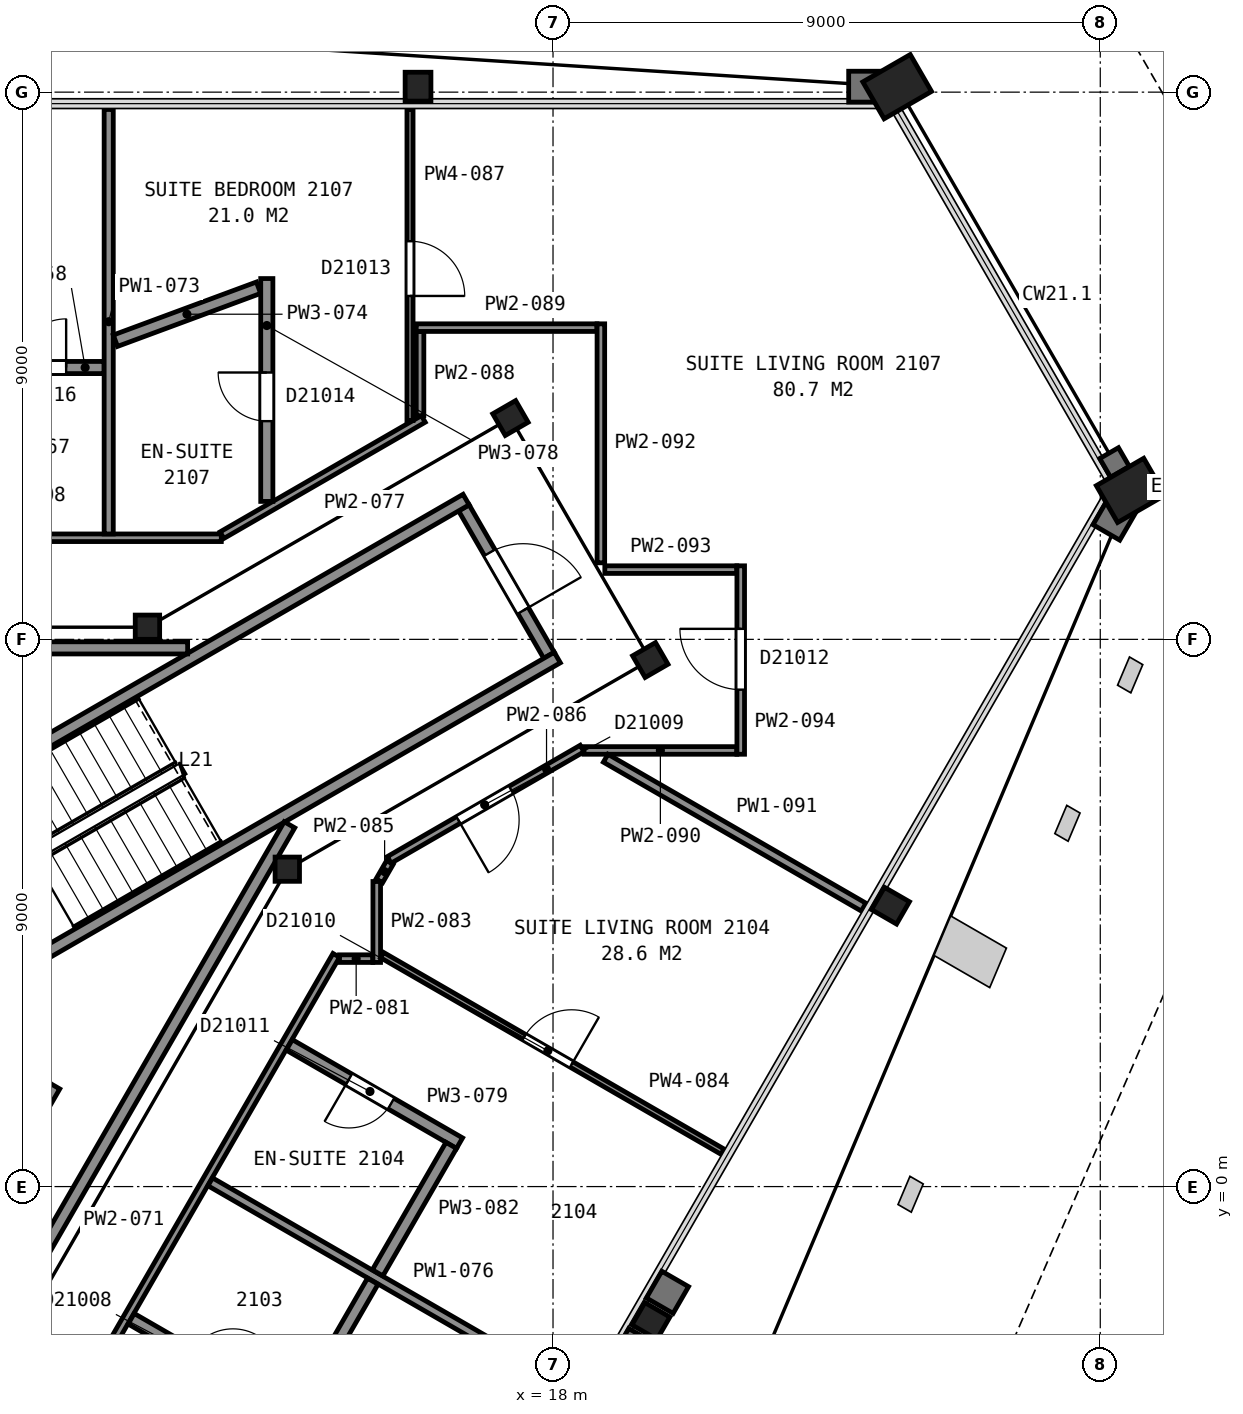
"""IFC4 building model, lengths in metres.
Left out: names, types, materials, properties, quantities, classifications, styles, units other than length and angle.
Written with IfcOpenShell. Run it as: python <this file> out.ifc"""

import sys

from ifc_helpers import new_model, si_unit, direction, frame, frame_2d, origin, origin_2d, place, context, subcontext, project, spatial, rectangle, hollow_rectangle, i_section, extrude, element, fill, save


model = new_model("IFC4")
c1 = context("Model", 3, precision=1e-05, world=origin(), true_north=direction((0.0, 1.0)))
c2 = subcontext(c1, "Body", "Model", "MODEL_VIEW")
j1 = project(units=[si_unit("LENGTHUNIT", "METRE"), si_unit("PLANEANGLEUNIT", "RADIAN")], contexts=[c1])
p1 = place(None, origin())
s1 = spatial("IfcSite", under=j1, at=p1, CompositionType="ELEMENT")
p2 = place(p1, origin())
s2 = spatial("IfcBuilding", under=s1, at=p2, CompositionType="ELEMENT")
p3 = place(p2, frame((0.0, 0.0, 92.8)))
s3 = spatial("IfcBuildingStorey", under=s2, at=p3, CompositionType="ELEMENT", Elevation=92.8)
p4 = place(p3, frame((23.66, 18.09, 0.0), z_axis=(0.0, 0.0, 1.0), x_axis=(0.5, -0.866025403784, 0.0)))
e1 = element("IfcColumn", 1, at=p4, inside=s3, PredefinedType="COLUMN", context=c2, shape_type="SweptSolid", body=[
    extrude(hollow_rectangle(XDim=0.7, YDim=0.9, WallThickness=0.065, at=origin_2d()), origin(), (0.0, 0.0, 1.0), 3.6),
])
for number, where, z_axis, x_axis in (
    (2, (15.78, 18.09, 0.0), (0.0, 0.0, 1.0), (1.0, 0.0, 0.0)),
    (3, (19.61, -2.21, 0.0), (0.0, 0.0, 1.0), (-0.5, -0.866, 0.0)),
    (4, (23.55, 4.62, 0.0), (0.0, 0.0, 1.0), (-0.5, -0.866, 0.0)),
):
    element("IfcColumn", number, at=place(p3, frame(where, z_axis=z_axis, x_axis=x_axis)), inside=s3, PredefinedType="COLUMN", context=c2, shape_type="SweptSolid", body=[
        extrude(i_section(OverallWidth=0.424, OverallDepth=0.475, WebThickness=0.048, FlangeThickness=0.077, FilletRadius=0.015, at=origin_2d()), origin(), (0.0, 0.0, 1.0), 3.6),
    ])
p5 = place(p3, frame((27.5, 11.45, 0.0), z_axis=(0.0, 0.0, 1.0), x_axis=(0.5, -0.866025403784, 0.0)))
e5 = element("IfcColumn", 5, at=p5, inside=s3, PredefinedType="COLUMN", context=c2, shape_type="SweptSolid", body=[
    extrude(hollow_rectangle(XDim=0.7, YDim=0.9, WallThickness=0.065, at=origin_2d()), origin(), (0.0, 0.0, 1.0), 3.6),
])
p6 = place(p3, frame((13.63, 5.22, 0.0), z_axis=(0.0, 0.0, 1.0), x_axis=(1.0, 0.0, 0.0)))
e6 = element("IfcColumn", 6, at=p6, inside=s3, PredefinedType="COLUMN", context=c2, shape_type="SweptSolid", body=[
    extrude(i_section(OverallWidth=0.401, OverallDepth=0.399, WebThickness=0.025, FlangeThickness=0.04, FilletRadius=0.015, at=origin_2d()), origin(), (0.0, 0.0, 1.0), 3.6),
])
for number, where, z_axis, x_axis in (
    (7, (19.6, 8.66, 0.0), (0.0, 0.0, 1.0), (0.5, -0.866, 0.0)),
    (8, (17.3, 12.64, 0.0), (0.0, 0.0, 1.0), (0.5, -0.866, 0.0)),
):
    element("IfcColumn", number, at=place(p3, frame(where, z_axis=z_axis, x_axis=x_axis)), inside=s3, PredefinedType="COLUMN", context=c2, shape_type="SweptSolid", body=[
        extrude(i_section(OverallWidth=0.411, OverallDepth=0.434, WebThickness=0.036, FlangeThickness=0.057, FilletRadius=0.015, at=origin_2d()), origin(), (0.0, 0.0, 1.0), 3.6),
    ])
p7 = place(p3, frame((11.33, 9.2, 0.0), z_axis=(0.0, 0.0, 1.0), x_axis=(1.0, 0.0, 0.0)))
e9 = element("IfcColumn", 9, at=p7, inside=s3, PredefinedType="COLUMN", context=c2, shape_type="SweptSolid", body=[
    extrude(i_section(OverallWidth=0.401, OverallDepth=0.399, WebThickness=0.025, FlangeThickness=0.04, FilletRadius=0.015, at=origin_2d()), origin(), (0.0, 0.0, 1.0), 3.6),
])
p8 = place(p3, frame((17.934, 8.738, 0.0), z_axis=(0.0, 0.0, 1.0), x_axis=(-0.49998411664, 0.866034573852, 0.0)))
e10 = element("IfcWall", 10, at=p8, inside=s3, PredefinedType="PARTITIONING", context=c2, shape_type="SweptSolid", body=[
    extrude(rectangle(XDim=2.8, YDim=0.2, at=frame_2d((1.4, 0.0))), origin(), (0.0, 0.0, 1.0), 3.35),
])
p9 = place(p8, frame((0.85, 0.0, 0.0)))
e11 = element("IfcOpeningElement", 11, at=p9, cuts=e10, PredefinedType="OPENING", context=c2, shape_type="SweptSolid", body=[
    extrude(rectangle(XDim=1.1, YDim=2.1, at=frame_2d((0.55, 1.05))), frame((0.0, 0.11, 0.0), z_axis=(0.0, -1.0, 0.0), x_axis=(1.0, 0.0, 0.0)), (0.0, 0.0, 1.0), 0.22),
])
for number, where, z_axis, x_axis in (
    (12, (6.178, 5.299, 0.0), (0.0, 0.0, 1.0), (0.866, 0.5, 0.0)),
    (13, (7.678, 2.701, 0.0), (0.0, 0.0, 1.0), (0.866, 0.5, 0.0)),
):
    element("IfcWall", number, at=place(p3, frame(where, z_axis=z_axis, x_axis=x_axis)), inside=s3, PredefinedType="PARTITIONING", context=c2, shape_type="SweptSolid", body=[
        extrude(rectangle(XDim=12.0, YDim=0.2, at=frame_2d((6.0, 0.0))), origin(), (0.0, 0.0, 1.0), 3.35),
    ])
p10 = place(p3, frame((7.451, -2.414, 0.0), z_axis=(0.0, 0.0, 1.0), x_axis=(0.500016218704, 0.866016039709, 0.0)))
e14 = element("IfcWall", 14, at=p10, inside=s3, PredefinedType="PARTITIONING", context=c2, shape_type="SweptSolid", body=[
    extrude(rectangle(XDim=4.7, YDim=0.2, at=frame_2d((2.35, 0.0))), origin(), (0.0, 0.0, 1.0), 3.6),
])
p11 = place(p3, frame((6.177, 8.86, 0.0), z_axis=(0.0, 0.0, 1.0), x_axis=(1.0, 0.0, 0.0)))
e15 = element("IfcWall", 15, at=p11, inside=s3, PredefinedType="PARTITIONING", context=c2, shape_type="SweptSolid", body=[
    extrude(rectangle(XDim=5.814, YDim=0.2, at=frame_2d((2.907, 0.0))), origin(), (0.0, 0.0, 1.0), 3.35),
])
p12 = place(p3, frame((8.492, -3.012, 0.0), z_axis=(0.0, 0.0, 1.0), x_axis=(0.499972957231, 0.866041016371, 0.0)))
e16 = element("IfcWall", 16, at=p12, inside=s3, PredefinedType="PARTITIONING", context=c2, shape_type="SweptSolid", body=[
    extrude(rectangle(XDim=10.349, YDim=0.2, at=frame_2d((5.174, 0.0))), origin(), (0.0, 0.0, 1.0), 3.35),
])
p13 = place(p3, frame((-12.544, 10.671, 0.0), z_axis=(0.0, 0.0, 1.0), x_axis=(1.0, 0.0, 0.0)))
e17 = element("IfcWall", 17, at=p13, inside=s3, PredefinedType="PARTITIONING", context=c2, shape_type="SweptSolid", body=[
    extrude(rectangle(XDim=25.089, YDim=0.125, at=frame_2d((12.544, 0.0))), origin(), (0.0, 0.0, 1.0), 2.613),
])
p14 = place(p13, frame((18.962, 0.0, 0.0)))
e18 = element("IfcOpeningElement", 18, at=p14, cuts=e17, PredefinedType="OPENING", context=c2, shape_type="SweptSolid", body=[
    extrude(rectangle(XDim=0.9, YDim=2.1, at=frame_2d((0.45, 1.05))), frame((0.0, 0.073, 0.0), z_axis=(0.0, -1.0, 0.0), x_axis=(1.0, 0.0, 0.0)), (0.0, 0.0, 1.0), 0.145),
])
p15 = place(p13, frame((14.857, 0.0, 0.0)))
e19 = element("IfcOpeningElement", 19, at=p15, cuts=e17, PredefinedType="OPENING", context=c2, shape_type="SweptSolid", body=[
    extrude(rectangle(XDim=1.0, YDim=2.1, at=frame_2d((0.5, 1.05))), frame((0.0, 0.073, 0.0), z_axis=(0.0, -1.0, 0.0), x_axis=(1.0, 0.0, 0.0)), (0.0, 0.0, 1.0), 0.145),
])
p16 = place(p3, frame((10.618, 13.471, 0.0), z_axis=(0.0, 0.0, 1.0), x_axis=(-1.0, 0.0, 0.0)))
e20 = element("IfcWall", 20, at=p16, inside=s3, PredefinedType="PARTITIONING", context=c2, shape_type="SweptSolid", body=[
    extrude(rectangle(XDim=2.025, YDim=0.2, at=frame_2d((1.012, 0.0))), origin(), (0.0, 0.0, 1.0), 2.613),
])
p17 = place(p16, frame((0.625, 0.0, 0.0)))
e21 = element("IfcOpeningElement", 21, at=p17, cuts=e20, PredefinedType="OPENING", context=c2, shape_type="SweptSolid", body=[
    extrude(rectangle(XDim=0.8, YDim=2.1, at=frame_2d((0.4, 1.05))), frame((0.0, 0.11, 0.0), z_axis=(0.0, -1.0, 0.0), x_axis=(1.0, 0.0, 0.0)), (0.0, 0.0, 1.0), 0.22),
])
p18 = place(p3, frame((9.41, -4.902, 0.0), z_axis=(0.0, 0.0, 1.0), x_axis=(0.499971244726, 0.866042005013, 0.0)))
e22 = element("IfcWall", 22, at=p18, inside=s3, PredefinedType="PARTITIONING", context=c2, shape_type="SweptSolid", body=[
    extrude(rectangle(XDim=10.052, YDim=0.125, at=frame_2d((5.026, 0.0))), origin(), (0.0, 0.0, 1.0), 2.613),
])
p19 = place(p3, frame((10.693, 10.733, 0.0), z_axis=(0.0, 0.0, 1.0), x_axis=(0.0, 1.0, 0.0)))
e23 = element("IfcWall", 23, at=p19, inside=s3, PredefinedType="PARTITIONING", context=c2, shape_type="SweptSolid", body=[
    extrude(rectangle(XDim=6.982, YDim=0.15, at=frame_2d((3.491, 0.0))), origin(), (0.0, 0.0, 1.0), 2.613),
])
p20 = place(p3, frame((10.803, 13.912, 0.0), z_axis=(0.0, 0.0, 1.0), x_axis=(0.937732337139, 0.347358696283, 0.0)))
e24 = element("IfcWall", 24, at=p20, inside=s3, PredefinedType="PARTITIONING", context=c2, shape_type="SweptSolid", body=[
    extrude(rectangle(XDim=2.51, YDim=0.2, at=frame_2d((1.255, 0.0))), origin(), (0.0, 0.0, 1.0), 2.613),
])
p21 = place(p3, frame((11.062, -2.174, 0.0), z_axis=(0.0, 0.0, 1.0), x_axis=(0.866078705744, -0.499907666931, 0.0)))
e25 = element("IfcWall", 25, at=p21, inside=s3, PredefinedType="PARTITIONING", context=c2, shape_type="SweptSolid", body=[
    extrude(rectangle(XDim=3.233, YDim=0.2, at=frame_2d((1.616, 0.0))), origin(), (0.0, 0.0, 1.0), 2.613),
])
p22 = place(p21, frame((1.133, 0.0, 0.0)))
e26 = element("IfcOpeningElement", 26, at=p22, cuts=e25, PredefinedType="OPENING", context=c2, shape_type="SweptSolid", body=[
    extrude(rectangle(XDim=0.8, YDim=2.1, at=frame_2d((0.4, 1.05))), frame((0.0, 0.11, 0.0), z_axis=(0.0, -1.0, 0.0), x_axis=(1.0, 0.0, 0.0)), (0.0, 0.0, 1.0), 0.22),
])
p23 = place(p3, frame((12.363, 0.078, 0.0), z_axis=(0.0, 0.0, 1.0), x_axis=(0.86605175433, -0.499954356739, 0.0)))
e27 = element("IfcWall", 27, at=p23, inside=s3, PredefinedType="PARTITIONING", context=c2, shape_type="SweptSolid", body=[
    extrude(rectangle(XDim=7.048, YDim=0.15, at=frame_2d((3.524, 0.0))), origin(), (0.0, 0.0, 1.0), 2.613),
])
p24 = place(p3, frame((12.556, 10.713, 0.0), z_axis=(0.0, 0.0, 1.0), x_axis=(0.86603035395, 0.499991425964, 0.0)))
e28 = element("IfcWall", 28, at=p24, inside=s3, PredefinedType="PARTITIONING", context=c2, shape_type="SweptSolid", body=[
    extrude(rectangle(XDim=3.824, YDim=0.125, at=frame_2d((1.912, 0.0))), origin(), (0.0, 0.0, 1.0), 2.613),
])
p25 = place(p3, frame((13.293, 11.269, 0.0), z_axis=(0.0, 0.0, 1.0), x_axis=(0.0, 1.0, 0.0)))
e29 = element("IfcWall", 29, at=p25, inside=s3, PredefinedType="PARTITIONING", context=c2, shape_type="SweptSolid", body=[
    extrude(rectangle(XDim=3.665, YDim=0.2, at=frame_2d((1.833, 0.0))), origin(), (0.0, 0.0, 1.0), 2.613),
])
p26 = place(p25, frame((1.32, 0.0, 0.0)))
e30 = element("IfcOpeningElement", 30, at=p26, cuts=e29, PredefinedType="OPENING", context=c2, shape_type="SweptSolid", body=[
    extrude(rectangle(XDim=0.8, YDim=2.1, at=frame_2d((0.4, 1.05))), frame((0.0, 0.11, 0.0), z_axis=(0.0, -1.0, 0.0), x_axis=(1.0, 0.0, 0.0)), (0.0, 0.0, 1.0), 0.22),
])
p27 = place(p3, frame((16.463, 0.714, 0.0), z_axis=(0.0, 0.0, 1.0), x_axis=(-0.86609757561, 0.499874973892, 0.0)))
e31 = element("IfcWall", 31, at=p27, inside=s3, PredefinedType="PARTITIONING", context=c2, shape_type="SweptSolid", body=[
    extrude(rectangle(XDim=3.233, YDim=0.2, at=frame_2d((1.617, 0.0))), origin(), (0.0, 0.0, 1.0), 2.613),
])
p28 = place(p27, frame((1.301, 0.0, 0.0)))
e32 = element("IfcOpeningElement", 32, at=p28, cuts=e31, PredefinedType="OPENING", context=c2, shape_type="SweptSolid", body=[
    extrude(rectangle(XDim=0.8, YDim=2.1, at=frame_2d((0.4, 1.05))), frame((0.0, 0.11, 0.0), z_axis=(0.0, -1.0, 0.0), x_axis=(1.0, 0.0, 0.0)), (0.0, 0.0, 1.0), 0.22),
])
p29 = place(p3, frame((13.826, -3.653, 0.0), z_axis=(0.0, 0.0, 1.0), x_axis=(0.499719542643, 0.866187265377, 0.0)))
e33 = element("IfcWall", 33, at=p29, inside=s3, PredefinedType="PARTITIONING", context=c2, shape_type="SweptSolid", body=[
    extrude(rectangle(XDim=2.42, YDim=0.2, at=frame_2d((1.21, 0.0))), origin(), (0.0, 0.0, 1.0), 2.613),
])
p30 = place(p3, frame((14.489, 3.749, 0.0), z_axis=(0.0, 0.0, 1.0), x_axis=(1.0, 0.0, 0.0)))
e34 = element("IfcWall", 34, at=p30, inside=s3, PredefinedType="PARTITIONING", context=c2, shape_type="SweptSolid", body=[
    extrude(rectangle(XDim=0.547, YDim=0.125, at=frame_2d((0.273, 0.0))), origin(), (0.0, 0.0, 1.0), 2.613),
])
p31 = place(p3, frame((15.115, -1.419, 0.0), z_axis=(0.0, 0.0, 1.0), x_axis=(0.50002218001, 0.866012597771, 0.0)))
e35 = element("IfcWall", 35, at=p31, inside=s3, PredefinedType="PARTITIONING", context=c2, shape_type="SweptSolid", body=[
    extrude(rectangle(XDim=2.421, YDim=0.2, at=frame_2d((1.21, 0.0))), origin(), (0.0, 0.0, 1.0), 2.613),
])
p32 = place(p3, frame((15.101, 3.687, 0.0), z_axis=(0.0, 0.0, 1.0), x_axis=(0.0, 1.0, 0.0)))
e36 = element("IfcWall", 36, at=p32, inside=s3, PredefinedType="PARTITIONING", context=c2, shape_type="SweptSolid", body=[
    extrude(rectangle(XDim=1.331, YDim=0.125, at=frame_2d((0.666, 0.0))), origin(), (0.0, 0.0, 1.0), 2.613),
])
p33 = place(p3, frame((20.787, 0.575, 0.0), z_axis=(0.0, 0.0, 1.0), x_axis=(-0.866012632051, 0.500022120638, 0.0)))
e37 = element("IfcWall", 37, at=p33, inside=s3, PredefinedType="PARTITIONING", context=c2, shape_type="SweptSolid", body=[
    extrude(rectangle(XDim=6.465, YDim=0.1, at=frame_2d((3.232, 0.0))), origin(), (0.0, 0.0, 1.0), 2.613),
])
p34 = place(p33, frame((2.866, 0.0, 0.0)))
e38 = element("IfcOpeningElement", 38, at=p34, cuts=e37, PredefinedType="OPENING", context=c2, shape_type="SweptSolid", body=[
    extrude(rectangle(XDim=0.9, YDim=2.1, at=frame_2d((0.45, 1.05))), frame((0.0, 0.06, 0.0), z_axis=(0.0, -1.0, 0.0), x_axis=(1.0, 0.0, 0.0)), (0.0, 0.0, 1.0), 0.12),
])
p35 = place(p3, frame((15.144, 5.029, 0.0), z_axis=(0.0, 0.0, 1.0), x_axis=(0.499682006278, 0.86620891972, 0.0)))
e39 = element("IfcWall", 39, at=p35, inside=s3, PredefinedType="PARTITIONING", context=c2, shape_type="SweptSolid", body=[
    extrude(rectangle(XDim=0.348, YDim=0.125, at=frame_2d((0.174, 0.0))), origin(), (0.0, 0.0, 1.0), 2.613),
])
p36 = place(p3, frame((18.478, 7.204, 0.0), z_axis=(0.0, 0.0, 1.0), x_axis=(-0.866011320536, -0.500024392108, 0.0)))
e40 = element("IfcWall", 40, at=p36, inside=s3, PredefinedType="PARTITIONING", context=c2, shape_type="SweptSolid", body=[
    extrude(rectangle(XDim=3.663, YDim=0.125, at=frame_2d((1.832, 0.0))), origin(), (0.0, 0.0, 1.0), 2.613),
])
p37 = place(p36, frame((1.351, 0.0, 0.0)))
e41 = element("IfcOpeningElement", 41, at=p37, cuts=e40, PredefinedType="OPENING", context=c2, shape_type="SweptSolid", body=[
    extrude(rectangle(XDim=1.0, YDim=2.1, at=frame_2d((0.5, 1.05))), frame((0.0, 0.073, 0.0), z_axis=(0.0, -1.0, 0.0), x_axis=(1.0, 0.0, 0.0)), (0.0, 0.0, 1.0), 0.145),
])
p38 = place(p3, frame((15.648, 12.599, 0.0), z_axis=(0.0, 0.0, 1.0), x_axis=(0.0, 1.0, 0.0)))
e42 = element("IfcWall", 42, at=p38, inside=s3, PredefinedType="PARTITIONING", context=c2, shape_type="SweptSolid", body=[
    extrude(rectangle(XDim=5.116, YDim=0.1, at=frame_2d((2.558, 0.0))), origin(), (0.0, 0.0, 1.0), 2.613),
])
p39 = place(p38, frame((2.049, 0.0, 0.0)))
e43 = element("IfcOpeningElement", 43, at=p39, cuts=e42, PredefinedType="OPENING", context=c2, shape_type="SweptSolid", body=[
    extrude(rectangle(XDim=0.9, YDim=2.1, at=frame_2d((0.45, 1.05))), frame((0.0, 0.06, 0.0), z_axis=(0.0, -1.0, 0.0), x_axis=(1.0, 0.0, 0.0)), (0.0, 0.0, 1.0), 0.12),
])
p40 = place(p3, frame((15.813, 12.679, 0.0), z_axis=(0.0, 0.0, 1.0), x_axis=(0.0, 1.0, 0.0)))
e44 = element("IfcWall", 44, at=p40, inside=s3, PredefinedType="PARTITIONING", context=c2, shape_type="SweptSolid", body=[
    extrude(rectangle(XDim=1.383, YDim=0.125, at=frame_2d((0.691, 0.0))), origin(), (0.0, 0.0, 1.0), 2.613),
])
p41 = place(p3, frame((15.75, 14.127, 0.0), z_axis=(0.0, 0.0, 1.0), x_axis=(1.0, 0.0, 0.0)))
e45 = element("IfcWall", 45, at=p41, inside=s3, PredefinedType="PARTITIONING", context=c2, shape_type="SweptSolid", body=[
    extrude(rectangle(XDim=2.971, YDim=0.125, at=frame_2d((1.486, 0.0))), origin(), (0.0, 0.0, 1.0), 2.613),
])
p42 = place(p3, frame((18.509, 7.173, 0.0), z_axis=(0.0, 0.0, 1.0), x_axis=(1.0, 0.0, 0.0)))
e46 = element("IfcWall", 46, at=p42, inside=s3, PredefinedType="PARTITIONING", context=c2, shape_type="SweptSolid", body=[
    extrude(rectangle(XDim=2.513, YDim=0.125, at=frame_2d((1.256, 0.0))), origin(), (0.0, 0.0, 1.0), 2.613),
])
p43 = place(p3, frame((18.866, 7.046, 0.0), z_axis=(0.0, 0.0, 1.0), x_axis=(0.866042025588, -0.499971209087, 0.0)))
e47 = element("IfcWall", 47, at=p43, inside=s3, PredefinedType="PARTITIONING", context=c2, shape_type="SweptSolid", body=[
    extrude(rectangle(XDim=4.899, YDim=0.15, at=frame_2d((2.45, 0.0))), origin(), (0.0, 0.0, 1.0), 2.613),
])
p44 = place(p3, frame((18.787, 10.259, 0.0), z_axis=(0.0, 0.0, 1.0), x_axis=(0.0, 1.0, 0.0)))
e48 = element("IfcWall", 48, at=p44, inside=s3, PredefinedType="PARTITIONING", context=c2, shape_type="SweptSolid", body=[
    extrude(rectangle(XDim=3.93, YDim=0.125, at=frame_2d((1.965, 0.0))), origin(), (0.0, 0.0, 1.0), 2.613),
])
p45 = place(p3, frame((18.852, 10.147, 0.0), z_axis=(0.0, 0.0, 1.0), x_axis=(1.0, 0.0, 0.0)))
e49 = element("IfcWall", 49, at=p45, inside=s3, PredefinedType="PARTITIONING", context=c2, shape_type="SweptSolid", body=[
    extrude(rectangle(XDim=2.17, YDim=0.125, at=frame_2d((1.085, 0.0))), origin(), (0.0, 0.0, 1.0), 2.613),
])
p46 = place(p3, frame((21.087, 10.209, 0.0), z_axis=(0.0, 0.0, 1.0), x_axis=(0.0, -1.0, 0.0)))
e50 = element("IfcWall", 50, at=p46, inside=s3, PredefinedType="PARTITIONING", context=c2, shape_type="SweptSolid", body=[
    extrude(rectangle(XDim=3.099, YDim=0.125, at=frame_2d((1.549, 0.0))), origin(), (0.0, 0.0, 1.0), 2.613),
])
p47 = place(p46, frame((1.037, 0.0, 0.0)))
e51 = element("IfcOpeningElement", 51, at=p47, cuts=e50, PredefinedType="OPENING", context=c2, shape_type="SweptSolid", body=[
    extrude(rectangle(XDim=1.0, YDim=2.1, at=frame_2d((0.5, 1.05))), frame((0.0, 0.073, 0.0), z_axis=(0.0, -1.0, 0.0), x_axis=(1.0, 0.0, 0.0)), (0.0, 0.0, 1.0), 0.145),
])
p48 = place(p9, origin())
e52 = element("IfcDoor", 52, at=p48, inside=s3, OperationType="SINGLE_SWING_LEFT", PredefinedType="DOOR", context=c2, shape_type="SweptSolid", body=[
    extrude(rectangle(XDim=1.1, YDim=2.1, at=frame_2d((0.55, 1.05))), frame((0.0, 0.025, 0.0), z_axis=(0.0, -1.0, 0.0), x_axis=(1.0, 0.0, 0.0)), (0.0, 0.0, 1.0), 0.05),
])
fill(e11, e52)
p49 = place(p17, origin())
e53 = element("IfcDoor", 53, at=p49, inside=s3, OperationType="SINGLE_SWING_LEFT", PredefinedType="DOOR", context=c2, shape_type="SweptSolid", body=[
    extrude(rectangle(XDim=0.8, YDim=2.1, at=frame_2d((0.4, 1.05))), frame((0.0, 0.025, 0.0), z_axis=(0.0, -1.0, 0.0), x_axis=(1.0, 0.0, 0.0)), (0.0, 0.0, 1.0), 0.05),
])
fill(e21, e53)
p50 = place(p26, origin())
e54 = element("IfcDoor", 54, at=p50, inside=s3, OperationType="SINGLE_SWING_RIGHT", PredefinedType="DOOR", context=c2, shape_type="SweptSolid", body=[
    extrude(rectangle(XDim=0.8, YDim=2.1, at=frame_2d((0.4, 1.05))), frame((0.0, 0.025, 0.0), z_axis=(0.0, -1.0, 0.0), x_axis=(1.0, 0.0, 0.0)), (0.0, 0.0, 1.0), 0.05),
])
fill(e30, e54)
p51 = place(p28, origin())
e55 = element("IfcDoor", 55, at=p51, inside=s3, OperationType="SINGLE_SWING_RIGHT", PredefinedType="DOOR", context=c2, shape_type="SweptSolid", body=[
    extrude(rectangle(XDim=0.8, YDim=2.1, at=frame_2d((0.4, 1.05))), frame((0.0, 0.025, 0.0), z_axis=(0.0, -1.0, 0.0), x_axis=(1.0, 0.0, 0.0)), (0.0, 0.0, 1.0), 0.05),
])
fill(e32, e55)
p52 = place(p34, origin())
e56 = element("IfcDoor", 56, at=p52, inside=s3, OperationType="SINGLE_SWING_LEFT", PredefinedType="DOOR", context=c2, shape_type="SweptSolid", body=[
    extrude(rectangle(XDim=0.9, YDim=2.1, at=frame_2d((0.45, 1.05))), frame((0.0, 0.025, 0.0), z_axis=(0.0, -1.0, 0.0), x_axis=(1.0, 0.0, 0.0)), (0.0, 0.0, 1.0), 0.05),
])
fill(e38, e56)
p53 = place(p37, origin())
e57 = element("IfcDoor", 57, at=p53, inside=s3, OperationType="SINGLE_SWING_RIGHT", PredefinedType="DOOR", context=c2, shape_type="SweptSolid", body=[
    extrude(rectangle(XDim=1.0, YDim=2.1, at=frame_2d((0.5, 1.05))), frame((0.0, 0.025, 0.0), z_axis=(0.0, -1.0, 0.0), x_axis=(1.0, 0.0, 0.0)), (0.0, 0.0, 1.0), 0.05),
])
fill(e41, e57)
p54 = place(p39, origin())
e58 = element("IfcDoor", 58, at=p54, inside=s3, OperationType="SINGLE_SWING_LEFT", PredefinedType="DOOR", context=c2, shape_type="SweptSolid", body=[
    extrude(rectangle(XDim=0.9, YDim=2.1, at=frame_2d((0.45, 1.05))), frame((0.0, 0.025, 0.0), z_axis=(0.0, -1.0, 0.0), x_axis=(1.0, 0.0, 0.0)), (0.0, 0.0, 1.0), 0.05),
])
fill(e43, e58)
p55 = place(p47, origin())
e59 = element("IfcDoor", 59, at=p55, inside=s3, OperationType="SINGLE_SWING_LEFT", PredefinedType="DOOR", context=c2, shape_type="SweptSolid", body=[
    extrude(rectangle(XDim=1.0, YDim=2.1, at=frame_2d((0.5, 1.05))), frame((0.0, 0.025, 0.0), z_axis=(0.0, -1.0, 0.0), x_axis=(1.0, 0.0, 0.0)), (0.0, 0.0, 1.0), 0.05),
])
fill(e51, e59)
save(model, sys.argv[1])
